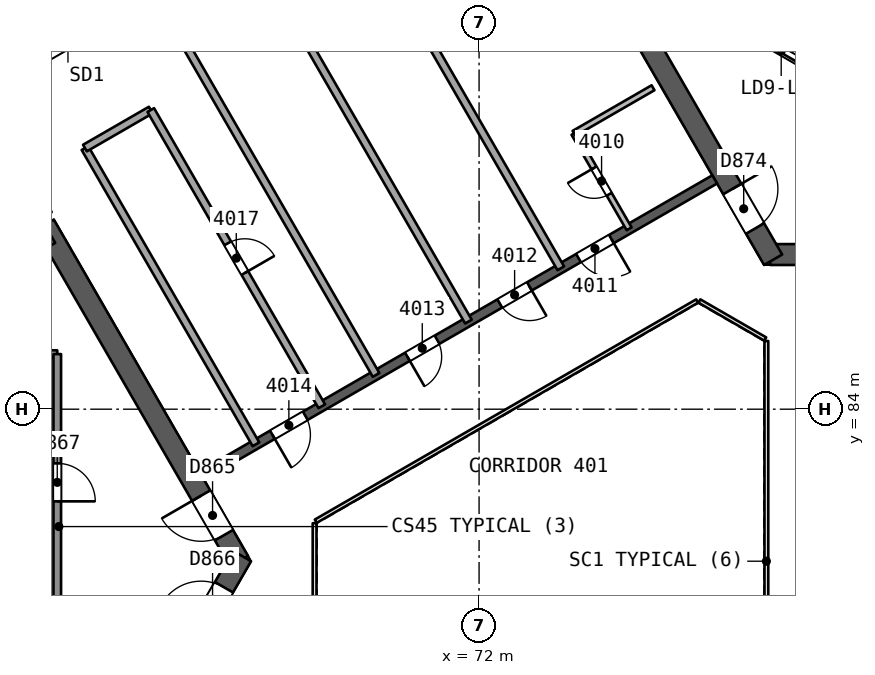
"""IFC4 building model, lengths in metres.
Left out: names, types, materials, properties, quantities, classifications, styles, units other than length and angle.
Written with IfcOpenShell. Run it as: python <this file> out.ifc"""

import sys

from ifc_helpers import new_model, si_unit, direction, frame, frame_2d, origin, place, context, subcontext, project, spatial, rectangle, extrude, element, fill, save


model = new_model("IFC4")
c1 = context("Model", 3, precision=1e-05, world=origin(), true_north=direction((0.0, 1.0)))
c2 = subcontext(c1, "Body", "Model", "MODEL_VIEW")
j1 = project(units=[si_unit("LENGTHUNIT", "METRE"), si_unit("PLANEANGLEUNIT", "RADIAN")], contexts=[c1])
p1 = place(None, origin())
s1 = spatial("IfcSite", under=j1, at=p1, CompositionType="ELEMENT")
p2 = place(p1, origin())
s2 = spatial("IfcBuilding", under=s1, at=p2, CompositionType="ELEMENT")
p3 = place(p2, frame((0.0, 0.0, 167.4)))
s3 = spatial("IfcBuildingStorey", under=s2, at=p3, CompositionType="ELEMENT", Elevation=167.4)
p4 = place(p3, frame((65.682, 80.0, 0.0), z_axis=(0.0, 0.0, 1.0), x_axis=(-0.500000202252, 0.866025287014, 0.0)))
e1 = element("IfcWall", 1, at=p4, inside=s3, PredefinedType="SHEAR", context=c2, shape_type="SweptSolid", body=[
    extrude(rectangle(XDim=10.221, YDim=0.55, at=frame_2d((5.111, 0.0))), origin(), (0.0, 0.0, 1.0), 3.7),
])
p5 = place(p4, frame((0.791, 0.0, 0.0)))
e2 = element("IfcOpeningElement", 2, at=p5, cuts=e1, PredefinedType="OPENING", context=c2, shape_type="SweptSolid", body=[
    extrude(rectangle(XDim=1.2, YDim=2.1, at=frame_2d((0.6, 1.05))), frame((0.0, 0.286, 0.0), z_axis=(0.0, -1.0, 0.0), x_axis=(1.0, 0.0, 0.0)), (0.0, 0.0, 1.0), 0.571),
])
p6 = place(p3, frame((60.709, 88.614, 0.0), z_axis=(0.0, 0.0, 1.0), x_axis=(-0.866020164116, -0.500009075263, 0.0)))
e3 = element("IfcWall", 3, at=p6, inside=s3, PredefinedType="SHEAR", context=c2, shape_type="SweptSolid", body=[
    extrude(rectangle(XDim=14.058, YDim=0.55, at=frame_2d((7.029, 0.0))), origin(), (0.0, 0.0, 1.0), 3.7),
])
p7 = place(p3, frame((60.709, 71.386, 0.0), z_axis=(0.0, 0.0, 1.0), x_axis=(0.500015938302, 0.866016201606, 0.0)))
e4 = element("IfcWall", 4, at=p7, inside=s3, PredefinedType="SHEAR", context=c2, shape_type="SweptSolid", body=[
    extrude(rectangle(XDim=10.105, YDim=0.55, at=frame_2d((5.053, 0.0))), origin(), (0.0, 0.0, 1.0), 3.7),
])
p8 = place(p7, frame((7.955, 0.0, 0.0)))
e5 = element("IfcOpeningElement", 5, at=p8, cuts=e4, PredefinedType="OPENING", context=c2, shape_type="SweptSolid", body=[
    extrude(rectangle(XDim=1.2, YDim=2.1, at=frame_2d((0.6, 1.05))), frame((0.0, 0.286, 0.0), z_axis=(0.0, -1.0, 0.0), x_axis=(1.0, 0.0, 0.0)), (0.0, 0.0, 1.0), 0.571),
])
p9 = place(p3, frame((79.659, 88.069, 0.0), z_axis=(0.0, 0.0, 1.0), x_axis=(1.0, 0.0, 0.0)))
e6 = element("IfcWall", 6, at=p9, inside=s3, PredefinedType="SHEAR", context=c2, shape_type="SweptSolid", body=[
    extrude(rectangle(XDim=10.221, YDim=0.55, at=frame_2d((5.111, 0.0))), origin(), (0.0, 0.0, 1.0), 3.7),
])
p10 = place(p9, frame((0.791, 0.0, 0.0)))
e7 = element("IfcOpeningElement", 7, at=p10, cuts=e6, PredefinedType="OPENING", context=c2, shape_type="SweptSolid", body=[
    extrude(rectangle(XDim=1.2, YDim=2.1, at=frame_2d((0.6, 1.05))), frame((0.0, 0.286, 0.0), z_axis=(0.0, -1.0, 0.0), x_axis=(1.0, 0.0, 0.0)), (0.0, 0.0, 1.0), 0.571),
])
p11 = place(p3, frame((74.686, 96.683, 0.0), z_axis=(0.0, 0.0, 1.0), x_axis=(0.499997818338, -0.866026663364, 0.0)))
e8 = element("IfcWall", 8, at=p11, inside=s3, PredefinedType="SHEAR", context=c2, shape_type="SweptSolid", body=[
    extrude(rectangle(XDim=10.105, YDim=0.55, at=frame_2d((5.052, 0.0))), origin(), (0.0, 0.0, 1.0), 3.7),
])
p12 = place(p11, frame((7.955, 0.0, 0.0)))
e9 = element("IfcOpeningElement", 9, at=p12, cuts=e8, PredefinedType="OPENING", context=c2, shape_type="SweptSolid", body=[
    extrude(rectangle(XDim=1.2, YDim=2.1, at=frame_2d((0.6, 1.05))), frame((0.0, 0.286, 0.0), z_axis=(0.0, -1.0, 0.0), x_axis=(1.0, 0.0, 0.0)), (0.0, 0.0, 1.0), 0.571),
])
p13 = place(p3, frame((78.2, 90.046, 0.0), z_axis=(0.0, 0.0, 1.0), x_axis=(-0.866026492143, -0.499998114903, 0.0)))
e10 = element("IfcWall", 10, at=p13, inside=s3, PredefinedType="SHEAR", context=c2, shape_type="SweptSolid", body=[
    extrude(rectangle(XDim=15.588, YDim=0.25, at=frame_2d((7.794, 0.0))), origin(), (0.0, 0.0, 1.0), 3.25),
])
p14 = place(p13, frame((3.138, 0.0, 0.0)))
e11 = element("IfcOpeningElement", 11, at=p14, cuts=e10, PredefinedType="OPENING", context=c2, shape_type="SweptSolid", body=[
    extrude(rectangle(XDim=1.0, YDim=2.1, at=frame_2d((0.5, 1.05))), frame((0.0, 0.135, 0.0), z_axis=(0.0, -1.0, 0.0), x_axis=(1.0, 0.0, 0.0)), (0.0, 0.0, 1.0), 0.271),
])
p15 = place(p13, frame((5.629, 0.0, 0.0)))
e12 = element("IfcOpeningElement", 12, at=p15, cuts=e10, PredefinedType="OPENING", context=c2, shape_type="SweptSolid", body=[
    extrude(rectangle(XDim=0.9, YDim=2.1, at=frame_2d((0.45, 1.05))), frame((0.0, 0.135, 0.0), z_axis=(0.0, -1.0, 0.0), x_axis=(1.0, 0.0, 0.0)), (0.0, 0.0, 1.0), 0.271),
])
p16 = place(p13, frame((8.435, 0.0, 0.0)))
e13 = element("IfcOpeningElement", 13, at=p16, cuts=e10, PredefinedType="OPENING", context=c2, shape_type="SweptSolid", body=[
    extrude(rectangle(XDim=0.9, YDim=2.1, at=frame_2d((0.45, 1.05))), frame((0.0, 0.135, 0.0), z_axis=(0.0, -1.0, 0.0), x_axis=(1.0, 0.0, 0.0)), (0.0, 0.0, 1.0), 0.271),
])
p17 = place(p13, frame((12.438, 0.0, 0.0)))
e14 = element("IfcOpeningElement", 14, at=p17, cuts=e10, PredefinedType="OPENING", context=c2, shape_type="SweptSolid", body=[
    extrude(rectangle(XDim=1.0, YDim=2.1, at=frame_2d((0.5, 1.05))), frame((0.0, 0.135, 0.0), z_axis=(0.0, -1.0, 0.0), x_axis=(1.0, 0.0, 0.0)), (0.0, 0.0, 1.0), 0.271),
])
p18 = place(p3, frame((75.948, 88.746, 0.0), z_axis=(0.0, 0.0, 1.0), x_axis=(-0.499987231761, 0.866032775405, 0.0)))
e15 = element("IfcWall", 15, at=p18, inside=s3, PredefinedType="PARTITIONING", context=c2, shape_type="SweptSolid", body=[
    extrude(rectangle(XDim=2.9, YDim=0.15, at=frame_2d((1.45, 0.0))), origin(), (0.0, 0.0, 1.0), 3.25),
])
p19 = place(p18, frame((1.05, 0.0, 0.0)))
e16 = element("IfcOpeningElement", 16, at=p19, cuts=e15, PredefinedType="OPENING", context=c2, shape_type="SweptSolid", body=[
    extrude(rectangle(XDim=0.8, YDim=2.1, at=frame_2d((0.4, 1.05))), frame((0.0, 0.085, 0.0), z_axis=(0.0, -1.0, 0.0), x_axis=(1.0, 0.0, 0.0)), (0.0, 0.0, 1.0), 0.171),
])
p20 = place(p3, frame((74.498, 91.257, 0.0), z_axis=(0.0, 0.0, 1.0), x_axis=(0.866038271014, 0.499977712642, 0.0)))
e17 = element("IfcWall", 17, at=p20, inside=s3, PredefinedType="PARTITIONING", context=c2, shape_type="SweptSolid", body=[
    extrude(rectangle(XDim=2.401, YDim=0.15, at=frame_2d((1.2, 0.0))), origin(), (0.0, 0.0, 1.0), 3.25),
])
for number, where, z_axis, x_axis in (
    (18, (68.411, 97.647, 0.0), (0.0, 0.0, 1.0), (0.5, -0.866, 0.0)),
    (19, (65.981, 96.244, 0.0), (0.0, 0.0, 1.0), (0.5, -0.866, 0.0)),
    (20, (63.552, 94.841, 0.0), (0.0, 0.0, 1.0), (0.5, -0.866, 0.0)),
):
    element("IfcWall", number, at=place(p3, frame(where, z_axis=z_axis, x_axis=x_axis)), inside=s3, PredefinedType="PARTITIONING", context=c2, shape_type="SweptSolid", body=[
        extrude(rectangle(XDim=11.477, YDim=0.2, at=frame_2d((5.739, 0.0))), origin(), (0.0, 0.0, 1.0), 3.25),
    ])
p21 = place(p3, frame((66.129, 83.077, 0.0), z_axis=(0.0, 0.0, 1.0), x_axis=(-0.5000018851, 0.866024315419, 0.0)))
e21 = element("IfcWall", 21, at=p21, inside=s3, PredefinedType="PARTITIONING", context=c2, shape_type="SweptSolid", body=[
    extrude(rectangle(XDim=9.0, YDim=0.2, at=frame_2d((4.5, 0.0))), origin(), (0.0, 0.0, 1.0), 3.25),
])
p22 = place(p3, frame((61.629, 90.871, 0.0), z_axis=(0.0, 0.0, 1.0), x_axis=(0.866041268327, 0.499972520799, 0.0)))
e22 = element("IfcWall", 22, at=p22, inside=s3, PredefinedType="PARTITIONING", context=c2, shape_type="SweptSolid", body=[
    extrude(rectangle(XDim=2.0, YDim=0.2, at=frame_2d((1.0, 0.0))), origin(), (0.0, 0.0, 1.0), 3.25),
])
p23 = place(p3, frame((63.361, 91.871, 0.0), z_axis=(0.0, 0.0, 1.0), x_axis=(0.5000018851, -0.866024315419, 0.0)))
e23 = element("IfcWall", 23, at=p23, inside=s3, PredefinedType="PARTITIONING", context=c2, shape_type="SweptSolid", body=[
    extrude(rectangle(XDim=9.0, YDim=0.2, at=frame_2d((4.5, 0.0))), origin(), (0.0, 0.0, 1.0), 3.25),
])
p24 = place(p23, frame((4.05, 0.0, 0.0)))
e24 = element("IfcOpeningElement", 24, at=p24, cuts=e23, PredefinedType="OPENING", context=c2, shape_type="SweptSolid", body=[
    extrude(rectangle(XDim=0.9, YDim=2.1, at=frame_2d((0.45, 1.05))), frame((0.0, 0.11, 0.0), z_axis=(0.0, -1.0, 0.0), x_axis=(1.0, 0.0, 0.0)), (0.0, 0.0, 1.0), 0.221),
])
p25 = place(p3, frame((42.319, 82.755, 0.0), z_axis=(0.0, 0.0, 1.0), x_axis=(0.866024017239, 0.50000240156, 0.0)))
e25 = element("IfcWall", 25, at=p25, inside=s3, PredefinedType="SOLIDWALL", context=c2, shape_type="SweptSolid", body=[
    extrude(rectangle(XDim=53.85, YDim=0.3, at=frame_2d((26.925, 0.0))), origin(), (0.0, 0.0, 1.0), 3.25),
])
p26 = place(p25, frame((20.581, 0.0, 0.0)))
e26 = element("IfcOpeningElement", 26, at=p26, cuts=e25, PredefinedType="OPENING", context=c2, shape_type="SweptSolid", body=[
    extrude(rectangle(XDim=2.4, YDim=2.4, at=frame_2d((1.2, 1.2))), frame((0.0, 0.161, 0.0), z_axis=(0.0, -1.0, 0.0), x_axis=(1.0, 0.0, 0.0)), (0.0, 0.0, 1.0), 0.321),
])
p27 = place(p25, frame((9.622, 0.0, 0.0)))
e27 = element("IfcOpeningElement", 27, at=p27, cuts=e25, PredefinedType="OPENING", context=c2, shape_type="SweptSolid", body=[
    extrude(rectangle(XDim=2.4, YDim=2.4, at=frame_2d((1.2, 1.2))), frame((0.0, 0.161, 0.0), z_axis=(0.0, -1.0, 0.0), x_axis=(1.0, 0.0, 0.0)), (0.0, 0.0, 1.0), 0.321),
])
p28 = place(p25, frame((40.79, 0.0, 0.0)))
e28 = element("IfcOpeningElement", 28, at=p28, cuts=e25, PredefinedType="OPENING", context=c2, shape_type="SweptSolid", body=[
    extrude(rectangle(XDim=2.4, YDim=2.4, at=frame_2d((1.2, 1.2))), frame((0.0, 0.161, 0.0), z_axis=(0.0, -1.0, 0.0), x_axis=(1.0, 0.0, 0.0)), (0.0, 0.0, 1.0), 0.321),
])
p29 = place(p25, frame((27.74, 0.0, 0.9)))
e29 = element("IfcOpeningElement", 29, at=p29, cuts=e25, PredefinedType="OPENING", context=c2, shape_type="SweptSolid", body=[
    extrude(rectangle(XDim=1.8, YDim=1.5, at=frame_2d((0.9, 0.75))), frame((0.0, 0.161, 0.0), z_axis=(0.0, -1.0, 0.0), x_axis=(1.0, 0.0, 0.0)), (0.0, 0.0, 1.0), 0.321),
])
p30 = place(p25, frame((24.934, 0.0, 0.9)))
e30 = element("IfcOpeningElement", 30, at=p30, cuts=e25, PredefinedType="OPENING", context=c2, shape_type="SweptSolid", body=[
    extrude(rectangle(XDim=1.8, YDim=1.5, at=frame_2d((0.9, 0.75))), frame((0.0, 0.161, 0.0), z_axis=(0.0, -1.0, 0.0), x_axis=(1.0, 0.0, 0.0)), (0.0, 0.0, 1.0), 0.321),
])
p31 = place(p3, frame((60.9, 85.45, 0.0), z_axis=(0.0, 0.0, 1.0), x_axis=(-1.0, 0.0, 0.0)))
e31 = element("IfcWall", 31, at=p31, inside=s3, PredefinedType="SOLIDWALL", context=c2, shape_type="SweptSolid", body=[
    extrude(rectangle(XDim=2.48, YDim=0.2, at=frame_2d((1.24, 0.0))), origin(), (0.0, 0.0, 1.0), 3.25),
])
p32 = place(p3, frame((60.9, 85.45, 0.0), z_axis=(0.0, 0.0, 1.0), x_axis=(0.0, -1.0, 0.0)))
e32 = element("IfcWall", 32, at=p32, inside=s3, PredefinedType="SOLIDWALL", context=c2, shape_type="SweptSolid", body=[
    extrude(rectangle(XDim=10.9, YDim=0.2, at=frame_2d((5.45, 0.0))), origin(), (0.0, 0.0, 1.0), 3.25),
])
p33 = place(p32, frame((2.875, 0.0, 0.0)))
e33 = element("IfcOpeningElement", 33, at=p33, cuts=e32, PredefinedType="OPENING", context=c2, shape_type="SweptSolid", body=[
    extrude(rectangle(XDim=1.0, YDim=2.1, at=frame_2d((0.5, 1.05))), frame((0.0, 0.11, 0.0), z_axis=(0.0, -1.0, 0.0), x_axis=(1.0, 0.0, 0.0)), (0.0, 0.0, 1.0), 0.221),
])
p34 = place(p32, frame((7.375, 0.0, 0.0)))
e34 = element("IfcOpeningElement", 34, at=p34, cuts=e32, PredefinedType="OPENING", context=c2, shape_type="SweptSolid", body=[
    extrude(rectangle(XDim=1.0, YDim=2.1, at=frame_2d((0.5, 1.05))), frame((0.0, 0.11, 0.0), z_axis=(0.0, -1.0, 0.0), x_axis=(1.0, 0.0, 0.0)), (0.0, 0.0, 1.0), 0.221),
])
p35 = place(p3, frame((86.77, 89.486, 0.0), z_axis=(0.0, 0.0, 1.0), x_axis=(-0.86601811187, 0.500012629753, 0.0)))
e35 = element("IfcWall", 35, at=p35, inside=s3, PredefinedType="SOLIDWALL", context=c2, shape_type="SweptSolid", body=[
    extrude(rectangle(XDim=10.9, YDim=0.2, at=frame_2d((5.45, 0.0))), origin(), (0.0, 0.0, 1.0), 3.25),
])
p36 = place(p35, frame((0.575, 0.0, 0.0)))
e36 = element("IfcOpeningElement", 36, at=p36, cuts=e35, PredefinedType="OPENING", context=c2, shape_type="SweptSolid", body=[
    extrude(rectangle(XDim=1.1, YDim=2.1, at=frame_2d((0.55, 1.05))), frame((0.0, 0.11, 0.0), z_axis=(0.0, -1.0, 0.0), x_axis=(1.0, 0.0, 0.0)), (0.0, 0.0, 1.0), 0.221),
])
p37 = place(p35, frame((2.825, 0.0, 0.0)))
e37 = element("IfcOpeningElement", 37, at=p37, cuts=e35, PredefinedType="OPENING", context=c2, shape_type="SweptSolid", body=[
    extrude(rectangle(XDim=1.1, YDim=2.1, at=frame_2d((0.55, 1.05))), frame((0.0, 0.11, 0.0), z_axis=(0.0, -1.0, 0.0), x_axis=(1.0, 0.0, 0.0)), (0.0, 0.0, 1.0), 0.221),
])
p38 = place(p35, frame((5.075, 0.0, 0.0)))
e38 = element("IfcOpeningElement", 38, at=p38, cuts=e35, PredefinedType="OPENING", context=c2, shape_type="SweptSolid", body=[
    extrude(rectangle(XDim=1.1, YDim=2.1, at=frame_2d((0.55, 1.05))), frame((0.0, 0.11, 0.0), z_axis=(0.0, -1.0, 0.0), x_axis=(1.0, 0.0, 0.0)), (0.0, 0.0, 1.0), 0.221),
])
p39 = place(p35, frame((7.325, 0.0, 0.0)))
e39 = element("IfcOpeningElement", 39, at=p39, cuts=e35, PredefinedType="OPENING", context=c2, shape_type="SweptSolid", body=[
    extrude(rectangle(XDim=1.1, YDim=2.1, at=frame_2d((0.55, 1.05))), frame((0.0, 0.11, 0.0), z_axis=(0.0, -1.0, 0.0), x_axis=(1.0, 0.0, 0.0)), (0.0, 0.0, 1.0), 0.221),
])
p40 = place(p3, frame((89.33, 90.872, 0.0), z_axis=(0.0, 0.0, 1.0), x_axis=(-0.866027589512, 0.49999621419, 0.0)))
e40 = element("IfcWall", 40, at=p40, inside=s3, PredefinedType="SOLIDWALL", context=c2, shape_type="SweptSolid", body=[
    extrude(rectangle(XDim=10.524, YDim=0.2, at=frame_2d((5.262, 0.0))), origin(), (0.0, 0.0, 1.0), 3.25),
])
p41 = place(p40, frame((0.312, 0.0, 0.0)))
e41 = element("IfcOpeningElement", 41, at=p41, cuts=e40, PredefinedType="OPENING", context=c2, shape_type="SweptSolid", body=[
    extrude(rectangle(XDim=0.9, YDim=2.1, at=frame_2d((0.45, 1.05))), frame((0.0, 0.11, 0.0), z_axis=(0.0, -1.0, 0.0), x_axis=(1.0, 0.0, 0.0)), (0.0, 0.0, 1.0), 0.221),
])
p42 = place(p3, frame((79.56, 74.206, 0.0), z_axis=(0.0, 0.0, 1.0), x_axis=(0.0, 1.0, 0.0)))
e42 = element("IfcWall", 42, at=p42, inside=s3, PredefinedType="PARTITIONING", context=c2, shape_type="SweptSolid", body=[
    extrude(rectangle(XDim=11.588, YDim=0.1, at=frame_2d((5.794, 0.0))), origin(), (0.0, 0.0, 1.0), 3.25),
])
p43 = place(p3, frame((79.53, 85.846, 0.0), z_axis=(0.0, 0.0, 1.0), x_axis=(-0.866041268327, 0.499972520799, 0.0)))
e43 = element("IfcWall", 43, at=p43, inside=s3, PredefinedType="PARTITIONING", context=c2, shape_type="SweptSolid", body=[
    extrude(rectangle(XDim=2.0, YDim=0.1, at=frame_2d((1.0, 0.0))), origin(), (0.0, 0.0, 1.0), 3.25),
])
p44 = place(p3, frame((77.738, 86.846, 0.0), z_axis=(0.0, 0.0, 1.0), x_axis=(-0.866026658274, -0.499997827154, 0.0)))
e44 = element("IfcWall", 44, at=p44, inside=s3, PredefinedType="PARTITIONING", context=c2, shape_type="SweptSolid", body=[
    extrude(rectangle(XDim=11.588, YDim=0.1, at=frame_2d((5.794, 0.0))), origin(), (0.0, 0.0, 1.0), 3.25),
])
p45 = place(p3, frame((67.672, 81.0, 0.0), z_axis=(0.0, 0.0, 1.0), x_axis=(0.0, -1.0, 0.0)))
e45 = element("IfcWall", 45, at=p45, inside=s3, PredefinedType="PARTITIONING", context=c2, shape_type="SweptSolid", body=[
    extrude(rectangle(XDim=2.0, YDim=0.1, at=frame_2d((1.0, 0.0))), origin(), (0.0, 0.0, 1.0), 3.25),
])
p46 = place(p19, origin())
e46 = element("IfcDoor", 46, at=p46, inside=s3, OperationType="SINGLE_SWING_RIGHT", PredefinedType="NOTDEFINED", context=c2, shape_type="SweptSolid", body=[
    extrude(rectangle(XDim=0.8, YDim=2.1, at=frame_2d((0.4, 1.05))), frame((0.0, 0.025, 0.0), z_axis=(0.0, -1.0, 0.0), x_axis=(1.0, 0.0, 0.0)), (0.0, 0.0, 1.0), 0.05),
])
fill(e16, e46)
p47 = place(p14, origin())
e47 = element("IfcDoor", 47, at=p47, inside=s3, OperationType="SINGLE_SWING_LEFT", PredefinedType="NOTDEFINED", context=c2, shape_type="SweptSolid", body=[
    extrude(rectangle(XDim=1.0, YDim=2.1, at=frame_2d((0.5, 1.05))), frame((0.0, 0.025, 0.0), z_axis=(0.0, -1.0, 0.0), x_axis=(1.0, 0.0, 0.0)), (0.0, 0.0, 1.0), 0.05),
])
fill(e11, e47)
p48 = place(p15, origin())
e48 = element("IfcDoor", 48, at=p48, inside=s3, OperationType="SINGLE_SWING_LEFT", PredefinedType="NOTDEFINED", context=c2, shape_type="SweptSolid", body=[
    extrude(rectangle(XDim=0.9, YDim=2.1, at=frame_2d((0.45, 1.05))), frame((0.0, 0.025, 0.0), z_axis=(0.0, -1.0, 0.0), x_axis=(1.0, 0.0, 0.0)), (0.0, 0.0, 1.0), 0.05),
])
fill(e12, e48)
p49 = place(p16, origin())
e49 = element("IfcDoor", 49, at=p49, inside=s3, OperationType="SINGLE_SWING_RIGHT", PredefinedType="NOTDEFINED", context=c2, shape_type="SweptSolid", body=[
    extrude(rectangle(XDim=0.9, YDim=2.1, at=frame_2d((0.45, 1.05))), frame((0.0, 0.025, 0.0), z_axis=(0.0, -1.0, 0.0), x_axis=(1.0, 0.0, 0.0)), (0.0, 0.0, 1.0), 0.05),
])
fill(e13, e49)
p50 = place(p17, origin())
e50 = element("IfcDoor", 50, at=p50, inside=s3, OperationType="SINGLE_SWING_RIGHT", PredefinedType="NOTDEFINED", context=c2, shape_type="SweptSolid", body=[
    extrude(rectangle(XDim=1.0, YDim=2.1, at=frame_2d((0.5, 1.05))), frame((0.0, 0.025, 0.0), z_axis=(0.0, -1.0, 0.0), x_axis=(1.0, 0.0, 0.0)), (0.0, 0.0, 1.0), 0.05),
])
fill(e14, e50)
p51 = place(p24, origin())
e51 = element("IfcDoor", 51, at=p51, inside=s3, OperationType="SINGLE_SWING_RIGHT", PredefinedType="NOTDEFINED", context=c2, shape_type="SweptSolid", body=[
    extrude(rectangle(XDim=0.9, YDim=2.1, at=frame_2d((0.45, 1.05))), frame((0.0, 0.025, 0.0), z_axis=(0.0, -1.0, 0.0), x_axis=(1.0, 0.0, 0.0)), (0.0, 0.0, 1.0), 0.05),
])
fill(e24, e51)
p52 = place(p26, origin())
e52 = element("IfcDoor", 52, at=p52, inside=s3, OperationType="SLIDING_TO_LEFT", PredefinedType="NOTDEFINED", context=c2, shape_type="SweptSolid", body=[
    extrude(rectangle(XDim=2.4, YDim=2.4, at=frame_2d((1.2, 1.2))), frame((0.0, 0.025, 0.0), z_axis=(0.0, -1.0, 0.0), x_axis=(1.0, 0.0, 0.0)), (0.0, 0.0, 1.0), 0.05),
])
fill(e26, e52)
p53 = place(p5, origin())
e53 = element("IfcDoor", 53, at=p53, inside=s3, OperationType="SINGLE_SWING_RIGHT", PredefinedType="NOTDEFINED", context=c2, shape_type="SweptSolid", body=[
    extrude(rectangle(XDim=1.2, YDim=2.1, at=frame_2d((0.6, 1.05))), frame((0.0, 0.025, 0.0), z_axis=(0.0, -1.0, 0.0), x_axis=(1.0, 0.0, 0.0)), (0.0, 0.0, 1.0), 0.05),
])
fill(e2, e53)
p54 = place(p8, origin())
e54 = element("IfcDoor", 54, at=p54, inside=s3, OperationType="SINGLE_SWING_LEFT", PredefinedType="NOTDEFINED", context=c2, shape_type="SweptSolid", body=[
    extrude(rectangle(XDim=1.2, YDim=2.1, at=frame_2d((0.6, 1.05))), frame((0.0, 0.025, 0.0), z_axis=(0.0, -1.0, 0.0), x_axis=(1.0, 0.0, 0.0)), (0.0, 0.0, 1.0), 0.05),
])
fill(e5, e54)
p55 = place(p33, origin())
e55 = element("IfcDoor", 55, at=p55, inside=s3, OperationType="SINGLE_SWING_RIGHT", PredefinedType="NOTDEFINED", context=c2, shape_type="SweptSolid", body=[
    extrude(rectangle(XDim=1.0, YDim=2.1, at=frame_2d((0.5, 1.05))), frame((0.0, 0.025, 0.0), z_axis=(0.0, -1.0, 0.0), x_axis=(1.0, 0.0, 0.0)), (0.0, 0.0, 1.0), 0.05),
])
fill(e33, e55)
p56 = place(p12, origin())
e56 = element("IfcDoor", 56, at=p56, inside=s3, OperationType="SINGLE_SWING_LEFT", PredefinedType="NOTDEFINED", context=c2, shape_type="SweptSolid", body=[
    extrude(rectangle(XDim=1.2, YDim=2.1, at=frame_2d((0.6, 1.05))), frame((0.0, 0.025, 0.0), z_axis=(0.0, -1.0, 0.0), x_axis=(1.0, 0.0, 0.0)), (0.0, 0.0, 1.0), 0.05),
])
fill(e9, e56)
p57 = place(p39, origin())
e57 = element("IfcDoor", 57, at=p57, inside=s3, OperationType="SLIDING_TO_LEFT", PredefinedType="NOTDEFINED", context=c2, shape_type="SweptSolid", body=[
    extrude(rectangle(XDim=1.1, YDim=2.1, at=frame_2d((0.55, 1.05))), frame((0.0, 0.025, 0.0), z_axis=(0.0, -1.0, 0.0), x_axis=(1.0, 0.0, 0.0)), (0.0, 0.0, 1.0), 0.05),
])
fill(e39, e57)
save(model, sys.argv[1])
